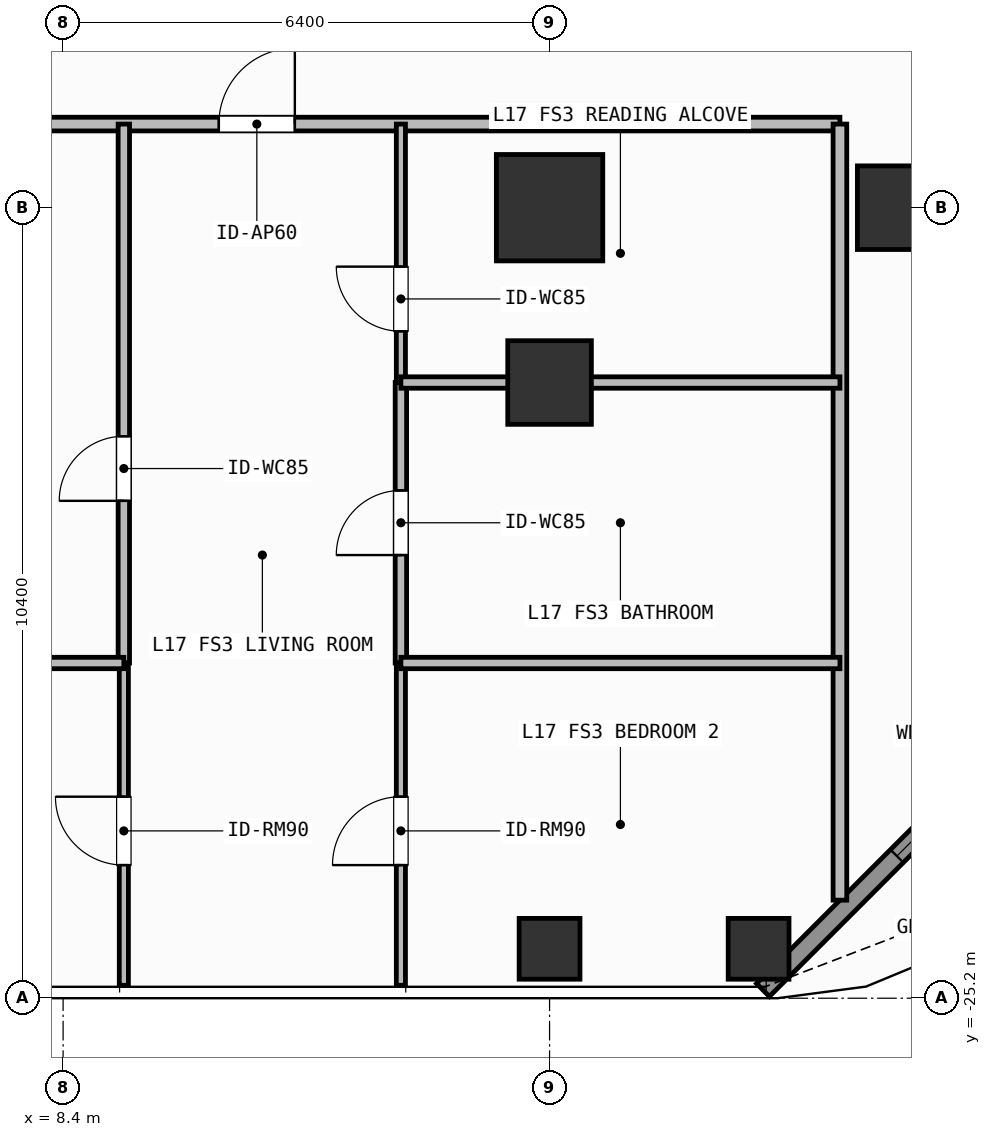
"""IFC4 building model, lengths in metres.
Left out: names, types, materials, properties, quantities, classifications, styles, units other than length and angle.
Written with IfcOpenShell. Run it as: python <this file> out.ifc"""

import sys

from ifc_helpers import new_model, si_unit, direction, frame, frame_2d, origin, origin_2d, place, context, subcontext, project, spatial, rectangle, hollow_rectangle, extrude, element, fill, save


model = new_model("IFC4")
c1 = context("Model", 3, precision=1e-05, world=origin(), true_north=direction((0.0, 1.0)))
c2 = subcontext(c1, "Body", "Model", "MODEL_VIEW")
j1 = project(units=[si_unit("LENGTHUNIT", "METRE"), si_unit("PLANEANGLEUNIT", "RADIAN")], contexts=[c1])
p1 = place(None, origin())
s1 = spatial("IfcSite", under=j1, at=p1, CompositionType="ELEMENT")
p2 = place(p1, origin())
s2 = spatial("IfcBuilding", under=s1, at=p2, CompositionType="ELEMENT")
p3 = place(p2, frame((0.0, 0.0, 65.7)))
s3 = spatial("IfcBuildingStorey", under=s2, at=p3, CompositionType="ELEMENT", Elevation=65.7)
p4 = place(p3, frame((14.8, -14.8, 0.0), z_axis=(0.0, 0.0, 1.0), x_axis=(1.0, 0.0, 0.0)))
e1 = element("IfcColumn", 1, at=p4, inside=s3, PredefinedType="COLUMN", context=c2, shape_type="SweptSolid", body=[
    extrude(rectangle(XDim=1.4, YDim=1.4, at=origin_2d()), origin(), (0.0, 0.0, 1.0), 3.9),
])
for number, where, z_axis, x_axis in (
    (2, (19.4, -14.8, 0.0), (0.0, 0.0, 1.0), (1.0, 0.0, 0.0)),
    (3, (14.8, -17.1, 0.0), (0.0, 0.0, 1.0), (1.0, 0.0, 0.0)),
):
    element("IfcColumn", number, at=place(p3, frame(where, z_axis=z_axis, x_axis=x_axis)), inside=s3, PredefinedType="COLUMN", context=c2, shape_type="SweptSolid", body=[
        extrude(rectangle(XDim=1.1, YDim=1.1, at=origin_2d()), origin(), (0.0, 0.0, 1.0), 3.9),
    ])
for number, where, z_axis, x_axis in (
    (4, (17.55, -24.55, 0.0), (0.0, 0.0, 1.0), (1.0, 0.0, 0.0)),
    (5, (14.8, -24.55, 0.0), (0.0, 0.0, 1.0), (1.0, 0.0, 0.0)),
):
    element("IfcColumn", number, at=place(p3, frame(where, z_axis=z_axis, x_axis=x_axis)), inside=s3, PredefinedType="COLUMN", context=c2, shape_type="SweptSolid", body=[
        extrude(hollow_rectangle(XDim=0.8, YDim=0.8, WallThickness=0.036, at=origin_2d()), origin(), (0.0, 0.0, 1.0), 3.9),
    ])
p5 = place(p3, frame((22.192, -20.508, 0.0), z_axis=(0.0, 0.0, 1.0), x_axis=(-0.707106781187, -0.707106781187, 0.0)))
e6 = element("IfcWall", 6, at=p5, inside=s3, PredefinedType="SOLIDWALL", context=c2, shape_type="SweptSolid", body=[
    extrude(rectangle(XDim=6.484, YDim=0.24, at=frame_2d((3.242, 0.0))), origin(), (0.0, 0.0, 1.0), 3.68),
])
p6 = place(p5, frame((2.492, 0.0, 0.8)))
e7 = element("IfcOpeningElement", 7, at=p6, cuts=e6, PredefinedType="OPENING", context=c2, shape_type="SweptSolid", body=[
    extrude(rectangle(XDim=1.5, YDim=1.85, at=frame_2d((0.75, 0.925))), frame((0.0, 0.13, 0.0), z_axis=(0.0, -1.0, 0.0), x_axis=(1.0, 0.0, 0.0)), (0.0, 0.0, 1.0), 0.26),
])
p7 = place(p3, frame((2.918, -13.7, 0.0), z_axis=(0.0, 0.0, 1.0), x_axis=(1.0, 0.0, 0.0)))
e8 = element("IfcWall", 8, at=p7, inside=s3, PredefinedType="PARTITIONING", context=c2, shape_type="SweptSolid", body=[
    extrude(rectangle(XDim=15.702, YDim=0.18, at=frame_2d((7.851, 0.0))), origin(), (0.0, 0.0, 1.0), 3.68),
])
p8 = place(p7, frame((7.531, 0.0, 0.0)))
e9 = element("IfcOpeningElement", 9, at=p8, cuts=e8, PredefinedType="OPENING", context=c2, shape_type="SweptSolid", body=[
    extrude(rectangle(XDim=1.0, YDim=2.2, at=frame_2d((0.5, 1.1))), frame((0.0, 0.1, 0.0), z_axis=(0.0, -1.0, 0.0), x_axis=(1.0, 0.0, 0.0)), (0.0, 0.0, 1.0), 0.2),
])
p9 = place(p3, frame((9.199, -20.79, 0.0), z_axis=(0.0, 0.0, 1.0), x_axis=(0.0, 1.0, 0.0)))
e10 = element("IfcWall", 10, at=p9, inside=s3, PredefinedType="PARTITIONING", context=c2, shape_type="SweptSolid", body=[
    extrude(rectangle(XDim=7.09, YDim=0.15, at=frame_2d((3.545, 0.0))), origin(), (0.0, 0.0, 1.0), 3.68),
])
p10 = place(p9, frame((2.133, 0.0, 0.0)))
e11 = element("IfcOpeningElement", 11, at=p10, cuts=e10, PredefinedType="OPENING", context=c2, shape_type="SweptSolid", body=[
    extrude(rectangle(XDim=0.85, YDim=2.1, at=frame_2d((0.425, 1.05))), frame((0.0, 0.085, 0.0), z_axis=(0.0, -1.0, 0.0), x_axis=(1.0, 0.0, 0.0)), (0.0, 0.0, 1.0), 0.17),
])
p11 = place(p3, frame((9.199, -25.03, 0.0), z_axis=(0.0, 0.0, 1.0), x_axis=(0.0, 1.0, 0.0)))
e12 = element("IfcWall", 12, at=p11, inside=s3, PredefinedType="PARTITIONING", context=c2, shape_type="SweptSolid", body=[
    extrude(rectangle(XDim=4.24, YDim=0.12, at=frame_2d((2.12, 0.0))), origin(), (0.0, 0.0, 1.0), 3.68),
])
p12 = place(p11, frame((1.581, 0.0, 0.0)))
e13 = element("IfcOpeningElement", 13, at=p12, cuts=e12, PredefinedType="OPENING", context=c2, shape_type="SweptSolid", body=[
    extrude(rectangle(XDim=0.9, YDim=2.1, at=frame_2d((0.45, 1.05))), frame((0.0, 0.07, 0.0), z_axis=(0.0, -1.0, 0.0), x_axis=(1.0, 0.0, 0.0)), (0.0, 0.0, 1.0), 0.14),
])
p13 = place(p3, frame((12.844, -20.79, 0.0), z_axis=(0.0, 0.0, 1.0), x_axis=(0.0, 1.0, 0.0)))
e14 = element("IfcWall", 14, at=p13, inside=s3, PredefinedType="PARTITIONING", context=c2, shape_type="SweptSolid", body=[
    extrude(rectangle(XDim=3.69, YDim=0.15, at=frame_2d((1.845, 0.0))), origin(), (0.0, 0.0, 1.0), 3.68),
])
p14 = place(p13, frame((1.42, 0.0, 0.0)))
e15 = element("IfcOpeningElement", 15, at=p14, cuts=e14, PredefinedType="OPENING", context=c2, shape_type="SweptSolid", body=[
    extrude(rectangle(XDim=0.85, YDim=2.1, at=frame_2d((0.425, 1.05))), frame((0.0, 0.085, 0.0), z_axis=(0.0, -1.0, 0.0), x_axis=(1.0, 0.0, 0.0)), (0.0, 0.0, 1.0), 0.17),
])
p15 = place(p3, frame((12.844, -17.1, 0.0), z_axis=(0.0, 0.0, 1.0), x_axis=(0.0, 1.0, 0.0)))
e16 = element("IfcWall", 16, at=p15, inside=s3, PredefinedType="PARTITIONING", context=c2, shape_type="SweptSolid", body=[
    extrude(rectangle(XDim=3.4, YDim=0.12, at=frame_2d((1.7, 0.0))), origin(), (0.0, 0.0, 1.0), 3.68),
])
p16 = place(p15, frame((0.675, 0.0, 0.0)))
e17 = element("IfcOpeningElement", 17, at=p16, cuts=e16, PredefinedType="OPENING", context=c2, shape_type="SweptSolid", body=[
    extrude(rectangle(XDim=0.85, YDim=2.1, at=frame_2d((0.425, 1.05))), frame((0.0, 0.07, 0.0), z_axis=(0.0, -1.0, 0.0), x_axis=(1.0, 0.0, 0.0)), (0.0, 0.0, 1.0), 0.14),
])
p17 = place(p3, frame((12.844, -25.03, 0.0), z_axis=(0.0, 0.0, 1.0), x_axis=(0.0, 1.0, 0.0)))
e18 = element("IfcWall", 18, at=p17, inside=s3, PredefinedType="PARTITIONING", context=c2, shape_type="SweptSolid", body=[
    extrude(rectangle(XDim=4.24, YDim=0.12, at=frame_2d((2.12, 0.0))), origin(), (0.0, 0.0, 1.0), 3.68),
])
p18 = place(p17, frame((1.581, 0.0, 0.0)))
e19 = element("IfcOpeningElement", 19, at=p18, cuts=e18, PredefinedType="OPENING", context=c2, shape_type="SweptSolid", body=[
    extrude(rectangle(XDim=0.9, YDim=2.1, at=frame_2d((0.45, 1.05))), frame((0.0, 0.07, 0.0), z_axis=(0.0, -1.0, 0.0), x_axis=(1.0, 0.0, 0.0)), (0.0, 0.0, 1.0), 0.14),
])
p19 = place(p3, frame((18.62, -23.91, 0.0), z_axis=(0.0, 0.0, 1.0), x_axis=(0.0, 1.0, 0.0)))
e20 = element("IfcWall", 20, at=p19, inside=s3, PredefinedType="PARTITIONING", context=c2, shape_type="SweptSolid", body=[
    extrude(rectangle(XDim=10.21, YDim=0.18, at=frame_2d((5.105, 0.0))), origin(), (0.0, 0.0, 1.0), 3.68),
])
p20 = place(p3, frame((2.918, -20.79, 0.0), z_axis=(0.0, 0.0, 1.0), x_axis=(1.0, 0.0, 0.0)))
e21 = element("IfcWall", 21, at=p20, inside=s3, PredefinedType="PARTITIONING", context=c2, shape_type="SweptSolid", body=[
    extrude(rectangle(XDim=6.281, YDim=0.15, at=frame_2d((3.141, 0.0))), origin(), (0.0, 0.0, 1.0), 3.68),
])
p21 = place(p3, frame((12.844, -17.1, 0.0), z_axis=(0.0, 0.0, 1.0), x_axis=(1.0, 0.0, 0.0)))
e22 = element("IfcWall", 22, at=p21, inside=s3, PredefinedType="PARTITIONING", context=c2, shape_type="SweptSolid", body=[
    extrude(rectangle(XDim=5.776, YDim=0.15, at=frame_2d((2.888, 0.0))), origin(), (0.0, 0.0, 1.0), 3.082),
])
p22 = place(p3, frame((12.844, -20.79, 0.0), z_axis=(0.0, 0.0, 1.0), x_axis=(1.0, 0.0, 0.0)))
e23 = element("IfcWall", 23, at=p22, inside=s3, PredefinedType="PARTITIONING", context=c2, shape_type="SweptSolid", body=[
    extrude(rectangle(XDim=5.776, YDim=0.15, at=frame_2d((2.888, 0.0))), origin(), (0.0, 0.0, 1.0), 3.68),
])
p23 = place(p6, origin())
e24 = element("IfcWindow", 24, at=p23, inside=s3, PartitioningType="SINGLE_PANEL", PredefinedType="WINDOW", context=c2, shape_type="SweptSolid", body=[
    extrude(rectangle(XDim=1.5, YDim=1.85, at=frame_2d((0.75, 0.925))), frame((0.0, 0.03, 0.0), z_axis=(0.0, -1.0, 0.0), x_axis=(1.0, 0.0, 0.0)), (0.0, 0.0, 1.0), 0.06),
])
fill(e7, e24)
p24 = place(p8, origin())
e25 = element("IfcDoor", 25, at=p24, inside=s3, OperationType="SINGLE_SWING_RIGHT", PredefinedType="DOOR", context=c2, shape_type="SweptSolid", body=[
    extrude(rectangle(XDim=1.0, YDim=2.2, at=frame_2d((0.5, 1.1))), frame((0.0, 0.025, 0.0), z_axis=(0.0, -1.0, 0.0), x_axis=(1.0, 0.0, 0.0)), (0.0, 0.0, 1.0), 0.05),
])
fill(e9, e25)
p25 = place(p10, origin())
e26 = element("IfcDoor", 26, at=p25, inside=s3, OperationType="SINGLE_SWING_LEFT", PredefinedType="DOOR", context=c2, shape_type="SweptSolid", body=[
    extrude(rectangle(XDim=0.85, YDim=2.1, at=frame_2d((0.425, 1.05))), frame((0.0, 0.025, 0.0), z_axis=(0.0, -1.0, 0.0), x_axis=(1.0, 0.0, 0.0)), (0.0, 0.0, 1.0), 0.05),
])
fill(e11, e26)
p26 = place(p12, origin())
e27 = element("IfcDoor", 27, at=p26, inside=s3, OperationType="SINGLE_SWING_RIGHT", PredefinedType="DOOR", context=c2, shape_type="SweptSolid", body=[
    extrude(rectangle(XDim=0.9, YDim=2.1, at=frame_2d((0.45, 1.05))), frame((0.0, 0.025, 0.0), z_axis=(0.0, -1.0, 0.0), x_axis=(1.0, 0.0, 0.0)), (0.0, 0.0, 1.0), 0.05),
])
fill(e13, e27)
p27 = place(p14, origin())
e28 = element("IfcDoor", 28, at=p27, inside=s3, OperationType="SINGLE_SWING_LEFT", PredefinedType="DOOR", context=c2, shape_type="SweptSolid", body=[
    extrude(rectangle(XDim=0.85, YDim=2.1, at=frame_2d((0.425, 1.05))), frame((0.0, 0.025, 0.0), z_axis=(0.0, -1.0, 0.0), x_axis=(1.0, 0.0, 0.0)), (0.0, 0.0, 1.0), 0.05),
])
fill(e15, e28)
p28 = place(p16, origin())
e29 = element("IfcDoor", 29, at=p28, inside=s3, OperationType="SINGLE_SWING_RIGHT", PredefinedType="DOOR", context=c2, shape_type="SweptSolid", body=[
    extrude(rectangle(XDim=0.85, YDim=2.1, at=frame_2d((0.425, 1.05))), frame((0.0, 0.025, 0.0), z_axis=(0.0, -1.0, 0.0), x_axis=(1.0, 0.0, 0.0)), (0.0, 0.0, 1.0), 0.05),
])
fill(e17, e29)
p29 = place(p18, origin())
e30 = element("IfcDoor", 30, at=p29, inside=s3, OperationType="SINGLE_SWING_LEFT", PredefinedType="DOOR", context=c2, shape_type="SweptSolid", body=[
    extrude(rectangle(XDim=0.9, YDim=2.1, at=frame_2d((0.45, 1.05))), frame((0.0, 0.025, 0.0), z_axis=(0.0, -1.0, 0.0), x_axis=(1.0, 0.0, 0.0)), (0.0, 0.0, 1.0), 0.05),
])
fill(e19, e30)
save(model, sys.argv[1])
